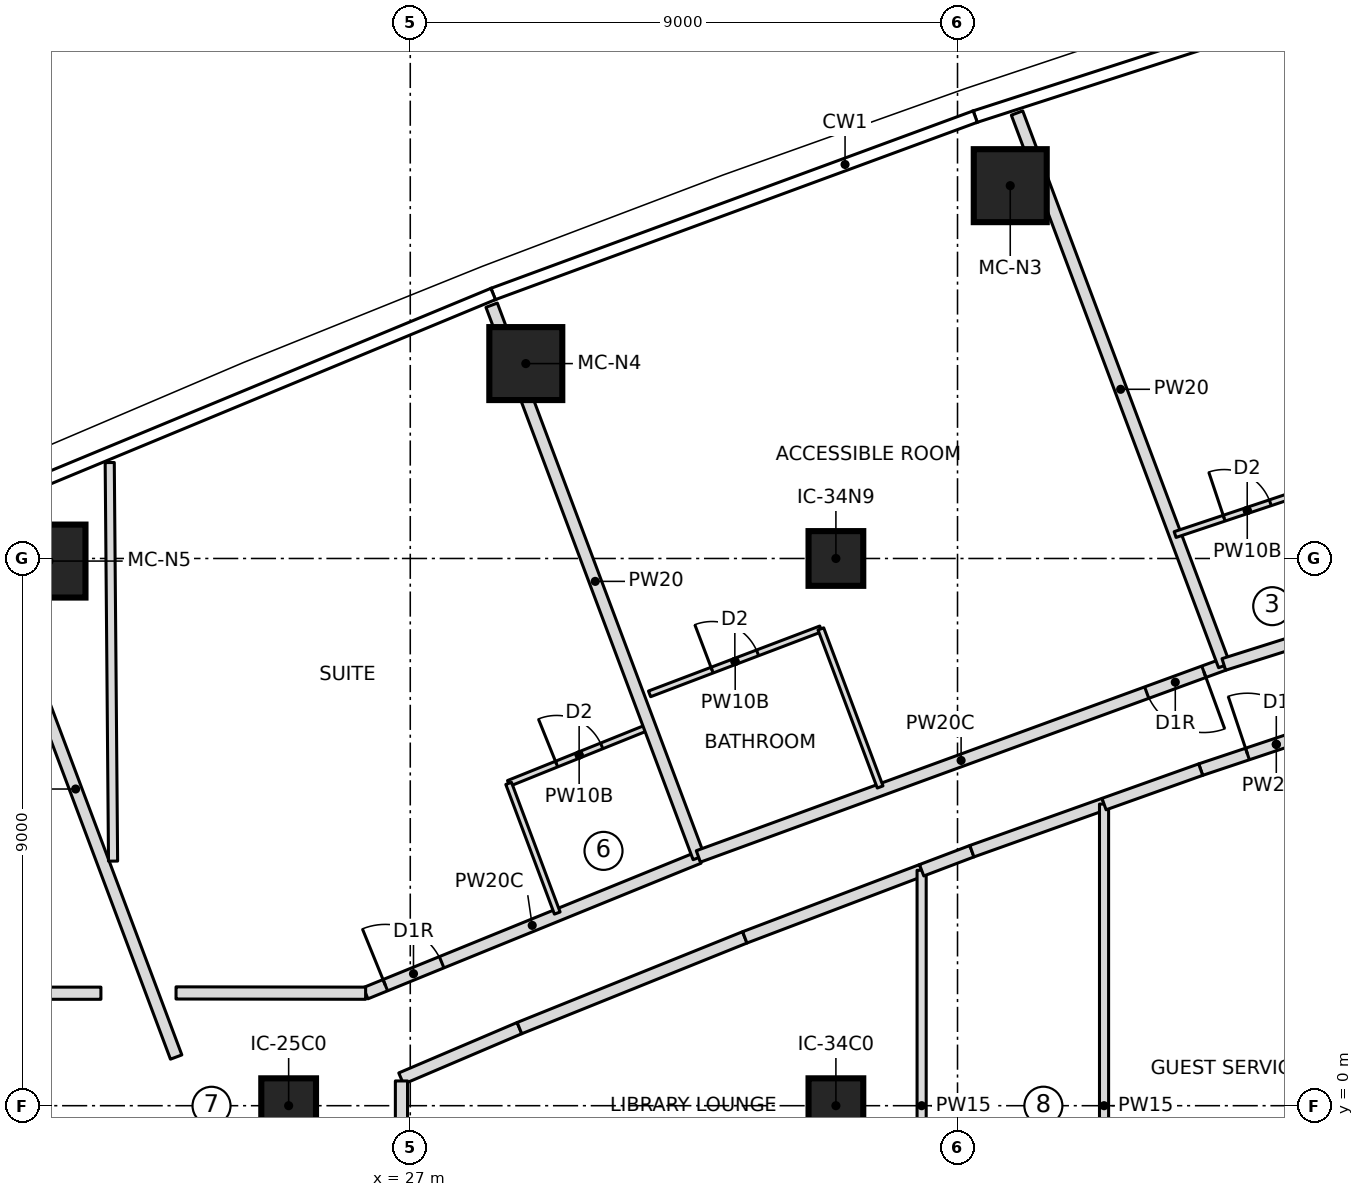
"""IFC4 building model, lengths in metres.
Left out: names, types, materials, properties, quantities, classifications, styles, units other than length and angle.
Written with IfcOpenShell. Run it as: python <this file> out.ifc"""

import sys

from ifc_helpers import new_model, si_unit, direction, frame, frame_2d, origin, origin_2d, place, context, subcontext, project, spatial, rectangle, extrude, element, fill, save


model = new_model("IFC4")
c1 = context("Model", 3, precision=1e-05, world=origin(), true_north=direction((0.0, 1.0)))
c2 = subcontext(c1, "Body", "Model", "MODEL_VIEW")
j1 = project(units=[si_unit("LENGTHUNIT", "METRE"), si_unit("PLANEANGLEUNIT", "RADIAN")], contexts=[c1])
p1 = place(None, origin())
s1 = spatial("IfcSite", under=j1, at=p1, CompositionType="ELEMENT")
p2 = place(p1, origin())
s2 = spatial("IfcBuilding", under=s1, at=p2, CompositionType="ELEMENT")
p3 = place(p2, frame((0.0, 0.0, 238.55)))
s3 = spatial("IfcBuildingStorey", under=s2, at=p3, CompositionType="ELEMENT", Elevation=238.55)
for number, where, z_axis, x_axis in (
    (1, (36.867, 15.132, 0.0), (0.0, 0.0, 1.0), (1.0, 0.0, 0.0)),
    (2, (28.9, 12.205, 0.0), (0.0, 0.0, 1.0), (1.0, 0.0, 0.0)),
    (3, (21.059, 8.958, 0.0), (0.0, 0.0, 1.0), (1.0, 0.0, 0.0)),
):
    element("IfcColumn", number, at=place(p3, frame(where, z_axis=z_axis, x_axis=x_axis)), inside=s3, PredefinedType="COLUMN", context=c2, shape_type="SweptSolid", body=[
        extrude(rectangle(XDim=1.2, YDim=1.2, at=origin_2d()), origin(), (0.0, 0.0, 1.0), 3.55),
    ])
for number, where, z_axis, x_axis in (
    (4, (25.0, 0.0, 0.0), (0.0, 0.0, 1.0), (1.0, 0.0, 0.0)),
    (5, (34.0, 0.0, 0.0), (0.0, 0.0, 1.0), (1.0, 0.0, 0.0)),
    (6, (34.0, 9.0, 0.0), (0.0, 0.0, 1.0), (1.0, 0.0, 0.0)),
):
    element("IfcColumn", number, at=place(p3, frame(where, z_axis=z_axis, x_axis=x_axis)), inside=s3, PredefinedType="COLUMN", context=c2, shape_type="SweptSolid", body=[
        extrude(rectangle(XDim=0.9, YDim=0.9, at=origin_2d()), origin(), (0.0, 0.0, 1.0), 3.55),
    ])
p4 = place(p3, frame((6.725, 1.85, 0.0), z_axis=(0.0, 0.0, 1.0), x_axis=(1.0, 0.0, 0.0)))
e7 = element("IfcWall", 7, at=p4, inside=s3, PredefinedType="PARTITIONING", context=c2, shape_type="SweptSolid", body=[
    extrude(rectangle(XDim=15.188, YDim=0.2, at=frame_2d((7.594, 0.0))), origin(), (0.0, 0.0, 1.0), 3.25),
])
p5 = place(p4, frame((7.257, 0.0, 0.0)))
e8 = element("IfcOpeningElement", 8, at=p5, cuts=e7, PredefinedType="OPENING", context=c2, shape_type="SweptSolid", body=[
    extrude(rectangle(XDim=1.0, YDim=2.1, at=frame_2d((0.5, 1.05))), frame((0.0, 0.11, 0.0), z_axis=(0.0, -1.0, 0.0), x_axis=(1.0, 0.0, 0.0)), (0.0, 0.0, 1.0), 0.22),
])
p6 = place(p3, frame((23.15, 0.8, 0.0), z_axis=(0.0, 0.0, 1.0), x_axis=(-0.351123441588, 0.936329177569, 0.0)))
e9 = element("IfcWall", 9, at=p6, inside=s3, PredefinedType="PARTITIONING", context=c2, shape_type="SweptSolid", body=[
    extrude(rectangle(XDim=9.416, YDim=0.2, at=frame_2d((4.708, 0.0))), origin(), (0.0, 0.0, 1.0), 3.25),
])
p7 = place(p3, frame((26.266, 1.85, 0.0), z_axis=(0.0, 0.0, 1.0), x_axis=(0.926191125494, 0.377054371486, 0.0)))
e10 = element("IfcWall", 10, at=p7, inside=s3, PredefinedType="PARTITIONING", context=c2, shape_type="SweptSolid", body=[
    extrude(rectangle(XDim=5.916, YDim=0.2, at=frame_2d((2.958, 0.0))), origin(), (0.0, 0.0, 1.0), 3.25),
])
p8 = place(p7, frame((0.35, 0.0, 0.0)))
e11 = element("IfcOpeningElement", 11, at=p8, cuts=e10, PredefinedType="OPENING", context=c2, shape_type="SweptSolid", body=[
    extrude(rectangle(XDim=1.0, YDim=2.1, at=frame_2d((0.5, 1.05))), frame((0.0, 0.11, 0.0), z_axis=(0.0, -1.0, 0.0), x_axis=(1.0, 0.0, 0.0)), (0.0, 0.0, 1.0), 0.22),
])
p9 = place(p3, frame((28.618, 5.301, 0.0), z_axis=(0.0, 0.0, 1.0), x_axis=(0.92761232595, 0.373544338394, 0.0)))
e12 = element("IfcWall", 12, at=p9, inside=s3, PredefinedType="PARTITIONING", context=c2, shape_type="SweptSolid", body=[
    extrude(rectangle(XDim=2.5, YDim=0.1, at=frame_2d((1.25, 0.0))), origin(), (0.0, 0.0, 1.0), 3.25),
])
p10 = place(p9, frame((0.85, 0.0, 0.0)))
e13 = element("IfcOpeningElement", 13, at=p10, cuts=e12, PredefinedType="OPENING", context=c2, shape_type="SweptSolid", body=[
    extrude(rectangle(XDim=0.8, YDim=2.1, at=frame_2d((0.4, 1.05))), frame((0.0, 0.06, 0.0), z_axis=(0.0, -1.0, 0.0), x_axis=(1.0, 0.0, 0.0)), (0.0, 0.0, 1.0), 0.12),
])
p11 = place(p3, frame((29.417, 3.168, 0.0), z_axis=(0.0, 0.0, 1.0), x_axis=(-0.351064703731, 0.936351202164, 0.0)))
e14 = element("IfcWall", 14, at=p11, inside=s3, PredefinedType="PARTITIONING", context=c2, shape_type="SweptSolid", body=[
    extrude(rectangle(XDim=2.278, YDim=0.1, at=frame_2d((1.139, 0.0))), origin(), (0.0, 0.0, 1.0), 3.25),
])
p12 = place(p3, frame((31.745, 4.081, 0.0), z_axis=(0.0, 0.0, 1.0), x_axis=(-0.351126198992, 0.936328143538, 0.0)))
e15 = element("IfcWall", 15, at=p12, inside=s3, PredefinedType="PARTITIONING", context=c2, shape_type="SweptSolid", body=[
    extrude(rectangle(XDim=9.703, YDim=0.2, at=frame_2d((4.852, 0.0))), origin(), (0.0, 0.0, 1.0), 3.25),
])
p13 = place(p3, frame((40.38, 7.257, 0.0), z_axis=(0.0, 0.0, 1.0), x_axis=(-0.939266239759, -0.343189351305, 0.0)))
e16 = element("IfcWall", 16, at=p13, inside=s3, PredefinedType="PARTITIONING", context=c2, shape_type="SweptSolid", body=[
    extrude(rectangle(XDim=9.2, YDim=0.2, at=frame_2d((4.6, 0.0))), origin(), (0.0, 0.0, 1.0), 3.25),
])
p14 = place(p13, frame((0.35, 0.0, 0.0)))
e17 = element("IfcOpeningElement", 17, at=p14, cuts=e16, PredefinedType="OPENING", context=c2, shape_type="SweptSolid", body=[
    extrude(rectangle(XDim=1.0, YDim=2.1, at=frame_2d((0.5, 1.05))), frame((0.0, 0.11, 0.0), z_axis=(0.0, -1.0, 0.0), x_axis=(1.0, 0.0, 0.0)), (0.0, 0.0, 1.0), 0.22),
])
p15 = place(p3, frame((30.935, 6.773, 0.0), z_axis=(0.0, 0.0, 1.0), x_axis=(0.934929871592, 0.354832545302, 0.0)))
e18 = element("IfcWall", 18, at=p15, inside=s3, PredefinedType="PARTITIONING", context=c2, shape_type="SweptSolid", body=[
    extrude(rectangle(XDim=3.013, YDim=0.1, at=frame_2d((1.506, 0.0))), origin(), (0.0, 0.0, 1.0), 3.25),
])
p16 = place(p15, frame((1.1, 0.0, 0.0)))
e19 = element("IfcOpeningElement", 19, at=p16, cuts=e18, PredefinedType="OPENING", context=c2, shape_type="SweptSolid", body=[
    extrude(rectangle(XDim=0.8, YDim=2.1, at=frame_2d((0.4, 1.05))), frame((0.0, 0.06, 0.0), z_axis=(0.0, -1.0, 0.0), x_axis=(1.0, 0.0, 0.0)), (0.0, 0.0, 1.0), 0.12),
])
p17 = place(p3, frame((33.752, 7.842, 0.0), z_axis=(0.0, 0.0, 1.0), x_axis=(0.351113807562, -0.936332790272, 0.0)))
e20 = element("IfcWall", 20, at=p17, inside=s3, PredefinedType="PARTITIONING", context=c2, shape_type="SweptSolid", body=[
    extrude(rectangle(XDim=2.777, YDim=0.1, at=frame_2d((1.389, 0.0))), origin(), (0.0, 0.0, 1.0), 3.25),
])
p18 = place(p3, frame((40.387, 7.238, 0.0), z_axis=(0.0, 0.0, 1.0), x_axis=(-0.351098633881, 0.936338480084, 0.0)))
e21 = element("IfcWall", 21, at=p18, inside=s3, PredefinedType="PARTITIONING", context=c2, shape_type="SweptSolid", body=[
    extrude(rectangle(XDim=9.707, YDim=0.2, at=frame_2d((4.853, 0.0))), origin(), (0.0, 0.0, 1.0), 3.25),
])
p19 = place(p3, frame((39.579, 9.393, 0.0), z_axis=(0.0, 0.0, 1.0), x_axis=(0.948468383404, 0.316871781141, 0.0)))
e22 = element("IfcWall", 22, at=p19, inside=s3, PredefinedType="PARTITIONING", context=c2, shape_type="SweptSolid", body=[
    extrude(rectangle(XDim=2.502, YDim=0.1, at=frame_2d((1.251, 0.0))), origin(), (0.0, 0.0, 1.0), 3.25),
])
p20 = place(p19, frame((0.85, 0.0, 0.0)))
e23 = element("IfcOpeningElement", 23, at=p20, cuts=e22, PredefinedType="OPENING", context=c2, shape_type="SweptSolid", body=[
    extrude(rectangle(XDim=0.8, YDim=2.1, at=frame_2d((0.4, 1.05))), frame((0.0, 0.06, 0.0), z_axis=(0.0, -1.0, 0.0), x_axis=(1.0, 0.0, 0.0)), (0.0, 0.0, 1.0), 0.12),
])
p21 = place(p3, frame((26.85, 0.447, 0.0), z_axis=(0.0, 0.0, 1.0), x_axis=(0.91990756443, 0.392135273732, 0.0)))
e24 = element("IfcWall", 24, at=p21, inside=s3, PredefinedType="PARTITIONING", context=c2, shape_type="SweptSolid", body=[
    extrude(rectangle(XDim=2.115, YDim=0.2, at=frame_2d((1.058, 0.0))), origin(), (0.0, 0.0, 1.0), 3.25),
])
p22 = place(p3, frame((28.796, 1.276, 0.0), z_axis=(0.0, 0.0, 1.0), x_axis=(0.927622894464, 0.373518092823, 0.0)))
e25 = element("IfcWall", 25, at=p22, inside=s3, PredefinedType="PARTITIONING", context=c2, shape_type="SweptSolid", body=[
    extrude(rectangle(XDim=3.995, YDim=0.2, at=frame_2d((1.998, 0.0))), origin(), (0.0, 0.0, 1.0), 3.25),
])
p23 = place(p3, frame((32.501, 2.768, 0.0), z_axis=(0.0, 0.0, 1.0), x_axis=(0.934964318004, 0.354741770954, 0.0)))
e26 = element("IfcWall", 26, at=p23, inside=s3, PredefinedType="PARTITIONING", context=c2, shape_type="SweptSolid", body=[
    extrude(rectangle(XDim=3.111, YDim=0.2, at=frame_2d((1.555, 0.0))), origin(), (0.0, 0.0, 1.0), 3.25),
])
p24 = place(p3, frame((35.41, -3.872, 0.0), z_axis=(0.0, 0.0, 1.0), x_axis=(0.0, 1.0, 0.0)))
e27 = element("IfcWall", 27, at=p24, inside=s3, PredefinedType="PARTITIONING", context=c2, shape_type="SweptSolid", body=[
    extrude(rectangle(XDim=7.744, YDim=0.15, at=frame_2d((3.872, 0.0))), origin(), (0.0, 0.0, 1.0), 3.25),
])
p25 = place(p3, frame((35.41, 3.872, 0.0), z_axis=(0.0, 0.0, 1.0), x_axis=(0.934902750064, 0.354903998178, 0.0)))
e28 = element("IfcWall", 28, at=p25, inside=s3, PredefinedType="PARTITIONING", context=c2, shape_type="SweptSolid", body=[
    extrude(rectangle(XDim=0.884, YDim=0.2, at=frame_2d((0.442, 0.0))), origin(), (0.0, 0.0, 1.0), 3.25),
])
p26 = place(p3, frame((36.236, 4.186, 0.0), z_axis=(0.0, 0.0, 1.0), x_axis=(0.941897392466, 0.335900732459, 0.0)))
e29 = element("IfcWall", 29, at=p26, inside=s3, PredefinedType="PARTITIONING", context=c2, shape_type="SweptSolid", body=[
    extrude(rectangle(XDim=2.308, YDim=0.2, at=frame_2d((1.154, 0.0))), origin(), (0.0, 0.0, 1.0), 3.25),
])
p27 = place(p3, frame((38.41, -4.961, 0.0), z_axis=(0.0, 0.0, 1.0), x_axis=(0.0, 1.0, 0.0)))
e30 = element("IfcWall", 30, at=p27, inside=s3, PredefinedType="PARTITIONING", context=c2, shape_type="SweptSolid", body=[
    extrude(rectangle(XDim=9.921, YDim=0.15, at=frame_2d((4.961, 0.0))), origin(), (0.0, 0.0, 1.0), 3.25),
])
p28 = place(p3, frame((39.999, 5.527, 0.0), z_axis=(0.0, 0.0, 1.0), x_axis=(0.948459565489, 0.316898173918, 0.0)))
e31 = element("IfcWall", 31, at=p28, inside=s3, PredefinedType="PARTITIONING", context=c2, shape_type="SweptSolid", body=[
    extrude(rectangle(XDim=2.622, YDim=0.2, at=frame_2d((1.311, 0.0))), origin(), (0.0, 0.0, 1.0), 3.25),
])
p29 = place(p28, frame((0.811, 0.0, 0.0)))
e32 = element("IfcOpeningElement", 32, at=p29, cuts=e31, PredefinedType="OPENING", context=c2, shape_type="SweptSolid", body=[
    extrude(rectangle(XDim=1.0, YDim=2.1, at=frame_2d((0.5, 1.05))), frame((0.0, 0.11, 0.0), z_axis=(0.0, -1.0, 0.0), x_axis=(1.0, 0.0, 0.0)), (0.0, 0.0, 1.0), 0.22),
])
p30 = place(p3, frame((38.41, 4.961, 0.0), z_axis=(0.0, 0.0, 1.0), x_axis=(0.941925088036, 0.335823061341, 0.0)))
e33 = element("IfcWall", 33, at=p30, inside=s3, PredefinedType="PARTITIONING", context=c2, shape_type="SweptSolid", body=[
    extrude(rectangle(XDim=1.687, YDim=0.2, at=frame_2d((0.844, 0.0))), origin(), (0.0, 0.0, 1.0), 3.25),
])
p31 = place(p3, frame((22.057, 10.578, 0.0), z_axis=(0.0, 0.0, 1.0), x_axis=(0.008379594055, -0.999964890585, 0.0)))
e34 = element("IfcWall", 34, at=p31, inside=s3, PredefinedType="PARTITIONING", context=c2, shape_type="SweptSolid", body=[
    extrude(rectangle(XDim=6.555, YDim=0.15, at=frame_2d((3.278, 0.0))), origin(), (0.0, 0.0, 1.0), 3.25),
])
p32 = place(p3, frame((40.38, 7.257, 0.0), z_axis=(0.0, 0.0, 1.0), x_axis=(0.953536454425, 0.301277662768, 0.0)))
e35 = element("IfcWall", 35, at=p32, inside=s3, PredefinedType="PARTITIONING", context=c2, shape_type="SweptSolid", body=[
    extrude(rectangle(XDim=8.306, YDim=0.2, at=frame_2d((4.153, 0.0))), origin(), (0.0, 0.0, 1.0), 3.25),
])
p33 = place(p32, frame((2.8, 0.0, 0.0)))
e36 = element("IfcOpeningElement", 36, at=p33, cuts=e35, PredefinedType="OPENING", context=c2, shape_type="SweptSolid", body=[
    extrude(rectangle(XDim=1.5, YDim=2.1, at=frame_2d((0.75, 1.05))), frame((0.0, 0.11, 0.0), z_axis=(0.0, -1.0, 0.0), x_axis=(1.0, 0.0, 0.0)), (0.0, 0.0, 1.0), 0.22),
])
p34 = place(p3, frame((26.855, -0.407, 0.0), z_axis=(0.0, 0.0, 1.0), x_axis=(0.0, 1.0, 0.0)))
e37 = element("IfcWall", 37, at=p34, inside=s3, PredefinedType="PARTITIONING", context=c2, shape_type="SweptSolid", body=[
    extrude(rectangle(XDim=0.814, YDim=0.2, at=frame_2d((0.407, 0.0))), origin(), (0.0, 0.0, 1.0), 3.25),
])
p35 = place(p3, frame((26.266, 1.85, 0.0), z_axis=(0.0, 0.0, 1.0), x_axis=(-0.999999006581, 0.001409552241, 0.0)))
e38 = element("IfcWall", 38, at=p35, inside=s3, PredefinedType="PARTITIONING", context=c2, shape_type="SweptSolid", body=[
    extrude(rectangle(XDim=3.118, YDim=0.2, at=frame_2d((1.559, 0.0))), origin(), (0.0, 0.0, 1.0), 3.25),
])
p36 = place(p10, origin())
e39 = element("IfcDoor", 39, at=p36, inside=s3, OperationType="SINGLE_SWING_LEFT", PredefinedType="DOOR", context=c2, shape_type="SweptSolid", body=[
    extrude(rectangle(XDim=0.8, YDim=2.1, at=frame_2d((0.4, 1.05))), frame((0.0, 0.025, 0.0), z_axis=(0.0, -1.0, 0.0), x_axis=(1.0, 0.0, 0.0)), (0.0, 0.0, 1.0), 0.05),
])
fill(e13, e39)
p37 = place(p8, origin())
e40 = element("IfcDoor", 40, at=p37, inside=s3, OperationType="SINGLE_SWING_RIGHT", PredefinedType="DOOR", context=c2, shape_type="SweptSolid", body=[
    extrude(rectangle(XDim=1.0, YDim=2.1, at=frame_2d((0.5, 1.05))), frame((0.0, 0.025, 0.0), z_axis=(0.0, -1.0, 0.0), x_axis=(1.0, 0.0, 0.0)), (0.0, 0.0, 1.0), 0.05),
])
fill(e11, e40)
p38 = place(p16, origin())
e41 = element("IfcDoor", 41, at=p38, inside=s3, OperationType="SINGLE_SWING_LEFT", PredefinedType="DOOR", context=c2, shape_type="SweptSolid", body=[
    extrude(rectangle(XDim=0.8, YDim=2.1, at=frame_2d((0.4, 1.05))), frame((0.0, 0.025, 0.0), z_axis=(0.0, -1.0, 0.0), x_axis=(1.0, 0.0, 0.0)), (0.0, 0.0, 1.0), 0.05),
])
fill(e19, e41)
p39 = place(p14, origin())
e42 = element("IfcDoor", 42, at=p39, inside=s3, OperationType="SINGLE_SWING_RIGHT", PredefinedType="DOOR", context=c2, shape_type="SweptSolid", body=[
    extrude(rectangle(XDim=1.0, YDim=2.1, at=frame_2d((0.5, 1.05))), frame((0.0, 0.025, 0.0), z_axis=(0.0, -1.0, 0.0), x_axis=(1.0, 0.0, 0.0)), (0.0, 0.0, 1.0), 0.05),
])
fill(e17, e42)
p40 = place(p20, origin())
e43 = element("IfcDoor", 43, at=p40, inside=s3, OperationType="SINGLE_SWING_LEFT", PredefinedType="DOOR", context=c2, shape_type="SweptSolid", body=[
    extrude(rectangle(XDim=0.8, YDim=2.1, at=frame_2d((0.4, 1.05))), frame((0.0, 0.025, 0.0), z_axis=(0.0, -1.0, 0.0), x_axis=(1.0, 0.0, 0.0)), (0.0, 0.0, 1.0), 0.05),
])
fill(e23, e43)
p41 = place(p29, origin())
e44 = element("IfcDoor", 44, at=p41, inside=s3, OperationType="SINGLE_SWING_LEFT", PredefinedType="DOOR", context=c2, shape_type="SweptSolid", body=[
    extrude(rectangle(XDim=1.0, YDim=2.1, at=frame_2d((0.5, 1.05))), frame((0.0, 0.025, 0.0), z_axis=(0.0, -1.0, 0.0), x_axis=(1.0, 0.0, 0.0)), (0.0, 0.0, 1.0), 0.05),
])
fill(e32, e44)
save(model, sys.argv[1])
